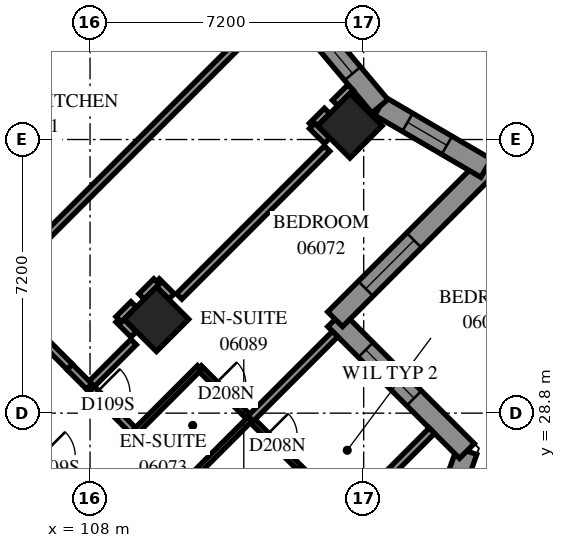
"""IFC4 building model, lengths in metres.
Left out: names, types, materials, properties, quantities, classifications, styles, units other than length and angle.
Written with IfcOpenShell. Run it as: python <this file> out.ifc"""

import sys

from ifc_helpers import new_model, si_unit, direction, frame, frame_2d, origin, origin_2d, place, context, subcontext, project, spatial, polyline, rectangle, outline, extrude, element, fill, save


model = new_model("IFC4")
c1 = context("Model", 3, precision=1e-05, world=origin(), true_north=direction((0.0, 1.0)))
c2 = subcontext(c1, "Body", "Model", "MODEL_VIEW")
j1 = project(units=[si_unit("LENGTHUNIT", "METRE"), si_unit("PLANEANGLEUNIT", "RADIAN")], contexts=[c1])
p1 = place(None, origin())
s1 = spatial("IfcSite", under=j1, at=p1, CompositionType="ELEMENT")
p2 = place(p1, origin())
s2 = spatial("IfcBuilding", under=s1, at=p2, CompositionType="ELEMENT")
p3 = place(p2, frame((0.0, 0.0, 27.0)))
s3 = spatial("IfcBuildingStorey", under=s2, at=p3, CompositionType="ELEMENT", Elevation=27.0)
for number, where, z_axis, x_axis in (
    (1, (114.838, 36.362, 0.0), (0.0, 0.0, 1.0), (0.707, -0.707, 0.0)),
    (2, (109.747, 31.271, 0.0), (0.0, 0.0, 1.0), (0.707, -0.707, 0.0)),
):
    element("IfcColumn", number, at=place(p3, frame(where, z_axis=z_axis, x_axis=x_axis)), inside=s3, PredefinedType="COLUMN", context=c2, shape_type="SweptSolid", body=[
        extrude(rectangle(XDim=1.2, YDim=1.2, at=origin_2d()), origin(), (0.0, 0.0, 1.0), 3.1),
    ])
p4 = place(p3, frame((116.159, 22.837, 0.0), z_axis=(0.0, 0.0, 1.0), x_axis=(0.3333124239, 0.9428164339, 0.0)))
e3 = element("IfcWall", 3, at=p4, inside=s3, PredefinedType="SOLIDWALL", context=c2, shape_type="SweptSolid", body=[
    extrude(outline(polyline([(-0.126, -0.275), (5.443, -0.275), (5.096, 0.275), (0.126, 0.275), (-0.126, -0.275)])), origin(), (0.0, 0.0, 1.0), 3.1),
])
p5 = place(p4, frame((0.816, 0.0, 0.5)))
e4 = element("IfcOpeningElement", 4, at=p5, cuts=e3, PredefinedType="OPENING", context=c2, shape_type="SweptSolid", body=[
    extrude(rectangle(XDim=1.2, YDim=2.45, at=frame_2d((0.6, 1.225))), frame((0.0, 0.285, 0.0), z_axis=(0.0, -1.0, 0.0), x_axis=(1.0, 0.0, 0.0)), (0.0, 0.0, 1.0), 0.57),
])
p6 = place(p4, frame((3.101, 0.0, 0.5)))
e5 = element("IfcOpeningElement", 5, at=p6, cuts=e3, PredefinedType="OPENING", context=c2, shape_type="SweptSolid", body=[
    extrude(rectangle(XDim=1.2, YDim=2.45, at=frame_2d((0.6, 1.225))), frame((0.0, 0.285, 0.0), z_axis=(0.0, -1.0, 0.0), x_axis=(1.0, 0.0, 0.0)), (0.0, 0.0, 1.0), 0.57),
])
p7 = place(p3, frame((117.915, 27.805, 0.0), z_axis=(0.0, 0.0, 1.0), x_axis=(-0.7071067812, 0.7071067812, 0.0)))
e6 = element("IfcWall", 6, at=p7, inside=s3, PredefinedType="SOLIDWALL", context=c2, shape_type="SweptSolid", body=[
    extrude(outline(polyline([(-0.173, -0.275), (4.627, -0.275), (5.177, 0.275), (0.173, 0.275), (-0.173, -0.275)])), origin(), (0.0, 0.0, 1.0), 3.1),
])
p8 = place(p7, frame((1.964, 0.0, 0.6)))
e7 = element("IfcOpeningElement", 7, at=p8, cuts=e6, PredefinedType="OPENING", context=c2, shape_type="SweptSolid", body=[
    extrude(rectangle(XDim=1.8, YDim=1.9, at=frame_2d((0.9, 0.95))), frame((0.0, 0.285, 0.0), z_axis=(0.0, -1.0, 0.0), x_axis=(1.0, 0.0, 0.0)), (0.0, 0.0, 1.0), 0.57),
])
p9 = place(p3, frame((114.449, 31.271, 0.0), z_axis=(0.0, 0.0, 1.0), x_axis=(0.7070978821, 0.7071156801, 0.0)))
e8 = element("IfcWall", 8, at=p9, inside=s3, PredefinedType="SOLIDWALL", context=c2, shape_type="SweptSolid", body=[
    extrude(outline(polyline([(0.275, -0.275), (5.975, -0.275), (5.262, 0.275), (-0.275, 0.275), (0.275, -0.275)])), origin(), (0.0, 0.0, 1.0), 3.1),
])
p10 = place(p9, frame((1.137, 0.0, 0.6)))
e9 = element("IfcOpeningElement", 9, at=p10, cuts=e8, PredefinedType="OPENING", context=c2, shape_type="SweptSolid", body=[
    extrude(rectangle(XDim=1.8, YDim=1.9, at=frame_2d((0.9, 0.95))), frame((0.0, 0.285, 0.0), z_axis=(0.0, -1.0, 0.0), x_axis=(1.0, 0.0, 0.0)), (0.0, 0.0, 1.0), 0.57),
])
p11 = place(p3, frame((118.422, 35.244, 0.0), z_axis=(0.0, 0.0, 1.0), x_axis=(-0.8634425497, 0.5044471859, 0.0)))
e10 = element("IfcWall", 10, at=p11, inside=s3, PredefinedType="SOLIDWALL", context=c2, shape_type="SweptSolid", body=[
    extrude(outline(polyline([(-0.356, -0.275), (3.189, -0.275), (3.284, 0.275), (0.356, 0.275), (-0.356, -0.275)])), origin(), (0.0, 0.0, 1.0), 3.1),
])
p12 = place(p11, frame((1.197, 0.0, 0.5)))
e11 = element("IfcOpeningElement", 11, at=p12, cuts=e10, PredefinedType="OPENING", context=c2, shape_type="SweptSolid", body=[
    extrude(rectangle(XDim=1.2, YDim=2.45, at=frame_2d((0.6, 1.225))), frame((0.0, 0.285, 0.0), z_axis=(0.0, -1.0, 0.0), x_axis=(1.0, 0.0, 0.0)), (0.0, 0.0, 1.0), 0.57),
])
p13 = place(p3, frame((115.627, 36.876, 0.0), z_axis=(0.0, 0.0, 1.0), x_axis=(-0.6427914459, 0.7660412241, 0.0)))
e12 = element("IfcWall", 12, at=p13, inside=s3, PredefinedType="SOLIDWALL", context=c2, shape_type="SweptSolid", body=[
    extrude(outline(polyline([(0.048, -0.275), (3.49, -0.275), (3.442, 0.275), (-0.048, 0.275), (0.048, -0.275)])), origin(), (0.0, 0.0, 1.0), 3.1),
])
p14 = place(p13, frame((1.121, 0.0, 0.5)))
e13 = element("IfcOpeningElement", 13, at=p14, cuts=e12, PredefinedType="OPENING", context=c2, shape_type="SweptSolid", body=[
    extrude(rectangle(XDim=1.2, YDim=2.45, at=frame_2d((0.6, 1.225))), frame((0.0, 0.285, 0.0), z_axis=(0.0, -1.0, 0.0), x_axis=(1.0, 0.0, 0.0)), (0.0, 0.0, 1.0), 0.57),
])
p15 = place(p3, frame((102.609, 31.769, 0.0), z_axis=(0.0, 0.0, 1.0), x_axis=(0.7071067812, -0.7071067812, 0.0)))
e14 = element("IfcWall", 14, at=p15, inside=s3, PredefinedType="PARTITIONING", context=c2, shape_type="SweptSolid", body=[
    extrude(rectangle(XDim=10.723, YDim=0.2, at=frame_2d((5.361, 0.0))), origin(), (0.0, 0.0, 1.0), 3.1),
])
p16 = place(p15, frame((4.15, 0.0, 0.0)))
e15 = element("IfcOpeningElement", 15, at=p16, cuts=e14, PredefinedType="OPENING", context=c2, shape_type="SweptSolid", body=[
    extrude(rectangle(XDim=0.9, YDim=2.1, at=frame_2d((0.45, 1.05))), frame((0.0, 0.11, 0.0), z_axis=(0.0, -1.0, 0.0), x_axis=(1.0, 0.0, 0.0)), (0.0, 0.0, 1.0), 0.22),
])
p17 = place(p15, frame((5.8, 0.0, 0.0)))
e16 = element("IfcOpeningElement", 16, at=p17, cuts=e14, PredefinedType="OPENING", context=c2, shape_type="SweptSolid", body=[
    extrude(rectangle(XDim=0.9, YDim=2.1, at=frame_2d((0.45, 1.05))), frame((0.0, 0.11, 0.0), z_axis=(0.0, -1.0, 0.0), x_axis=(1.0, 0.0, 0.0)), (0.0, 0.0, 1.0), 0.22),
])
p18 = place(p3, frame((105.437, 32.045, 0.0), z_axis=(0.0, 0.0, 1.0), x_axis=(0.7070125995, 0.7072009503, 0.0)))
e17 = element("IfcWall", 17, at=p18, inside=s3, PredefinedType="PARTITIONING", context=c2, shape_type="SweptSolid", body=[
    extrude(rectangle(XDim=10.618, YDim=0.2, at=frame_2d((5.309, 0.0))), origin(), (0.0, 0.0, 1.0), 3.1),
])
p19 = place(p3, frame((107.977, 29.499, 0.0), z_axis=(0.0, 0.0, 1.0), x_axis=(0.7071067812, -0.7071067812, 0.0)))
e18 = element("IfcWall", 18, at=p19, inside=s3, PredefinedType="PARTITIONING", context=c2, shape_type="SweptSolid", body=[
    extrude(rectangle(XDim=7.198, YDim=0.2, at=frame_2d((3.599, 0.0))), origin(), (0.0, 0.0, 1.0), 3.1),
])
p20 = place(p19, frame((0.247, 0.0, 0.0)))
e19 = element("IfcOpeningElement", 19, at=p20, cuts=e18, PredefinedType="OPENING", context=c2, shape_type="SweptSolid", body=[
    extrude(rectangle(XDim=0.9, YDim=2.1, at=frame_2d((0.45, 1.05))), frame((0.0, 0.11, 0.0), z_axis=(0.0, -1.0, 0.0), x_axis=(1.0, 0.0, 0.0)), (0.0, 0.0, 1.0), 0.22),
])
p21 = place(p19, frame((5.899, 0.0, 0.0)))
e20 = element("IfcOpeningElement", 20, at=p21, cuts=e18, PredefinedType="OPENING", context=c2, shape_type="SweptSolid", body=[
    extrude(rectangle(XDim=0.9, YDim=2.1, at=frame_2d((0.45, 1.05))), frame((0.0, 0.11, 0.0), z_axis=(0.0, -1.0, 0.0), x_axis=(1.0, 0.0, 0.0)), (0.0, 0.0, 1.0), 0.22),
])
p22 = place(p3, frame((110.345, 31.871, 0.0), z_axis=(0.0, 0.0, 1.0), x_axis=(0.7071067812, 0.7071067812, 0.0)))
e21 = element("IfcWall", 21, at=p22, inside=s3, PredefinedType="PARTITIONING", context=c2, shape_type="SweptSolid", body=[
    extrude(rectangle(XDim=5.504, YDim=0.2, at=frame_2d((2.752, 0.0))), origin(), (0.0, 0.0, 1.0), 3.1),
])
p23 = place(p3, frame((110.875, 29.995, 0.0), z_axis=(0.0, 0.0, 1.0), x_axis=(0.7071067812, -0.7071067812, 0.0)))
e22 = element("IfcWall", 22, at=p23, inside=s3, PredefinedType="PARTITIONING", context=c2, shape_type="SweptSolid", body=[
    extrude(rectangle(XDim=3.801, YDim=0.15, at=frame_2d((1.901, 0.0))), origin(), (0.0, 0.0, 1.0), 3.1),
])
p24 = place(p23, frame((0.598, 0.0, 0.0)))
e23 = element("IfcOpeningElement", 23, at=p24, cuts=e22, PredefinedType="OPENING", context=c2, shape_type="SweptSolid", body=[
    extrude(rectangle(XDim=0.8, YDim=2.1, at=frame_2d((0.4, 1.05))), frame((0.0, 0.085, 0.0), z_axis=(0.0, -1.0, 0.0), x_axis=(1.0, 0.0, 0.0)), (0.0, 0.0, 1.0), 0.17),
])
p25 = place(p23, frame((2.507, 0.0, 0.0)))
e24 = element("IfcOpeningElement", 24, at=p25, cuts=e22, PredefinedType="OPENING", context=c2, shape_type="SweptSolid", body=[
    extrude(rectangle(XDim=0.8, YDim=2.1, at=frame_2d((0.4, 1.05))), frame((0.0, 0.085, 0.0), z_axis=(0.0, -1.0, 0.0), x_axis=(1.0, 0.0, 0.0)), (0.0, 0.0, 1.0), 0.17),
])
p26 = place(p3, frame((112.221, 28.655, 0.0), z_axis=(0.0, 0.0, 1.0), x_axis=(0.7071067812, 0.7071067812, 0.0)))
e25 = element("IfcWall", 25, at=p26, inside=s3, PredefinedType="PARTITIONING", context=c2, shape_type="SweptSolid", body=[
    extrude(rectangle(XDim=3.15, YDim=0.2, at=frame_2d((1.575, 0.0))), origin(), (0.0, 0.0, 1.0), 3.1),
])
p27 = place(p3, frame((105.435, 32.049, 0.0), z_axis=(0.0, 0.0, 1.0), x_axis=(0.7074545101, -0.7067588812, 0.0)))
e26 = element("IfcWall", 26, at=p27, inside=s3, PredefinedType="PARTITIONING", context=c2, shape_type="SweptSolid", body=[
    extrude(rectangle(XDim=2.875, YDim=0.2, at=frame_2d((1.438, 0.0))), origin(), (0.0, 0.0, 1.0), 3.1),
])
for number, where, z_axis, x_axis in (
    (27, (109.182, 28.3, 0.0), (0.0, 0.0, 1.0), (0.707, 0.708, 0.0)),
    (28, (111.865, 25.616, 0.0), (0.0, 0.0, 1.0), (0.708, 0.707, 0.0)),
    (29, (110.522, 26.96, 0.0), (0.0, 0.0, 1.0), (0.708, 0.707, 0.0)),
):
    element("IfcWall", number, at=place(p3, frame(where, z_axis=z_axis, x_axis=x_axis)), inside=s3, PredefinedType="PARTITIONING", context=c2, shape_type="SweptSolid", body=[
        extrude(rectangle(XDim=2.4, YDim=0.15, at=frame_2d((1.2, 0.0))), origin(), (0.0, 0.0, 1.0), 3.1),
    ])
p28 = place(p3, frame((115.438, 26.78, 0.0), z_axis=(0.0, 0.0, 1.0), x_axis=(0.7071067812, 0.7071067812, 0.0)))
e30 = element("IfcWall", 30, at=p28, inside=s3, PredefinedType="PARTITIONING", context=c2, shape_type="SweptSolid", body=[
    extrude(rectangle(XDim=2.201, YDim=0.2, at=frame_2d((1.101, 0.0))), origin(), (0.0, 0.0, 1.0), 3.1),
])
p29 = place(p3, frame((107.978, 29.504, 0.0), z_axis=(0.0, 0.0, 1.0), x_axis=(0.7071067812, 0.7071067812, 0.0)))
e31 = element("IfcWall", 31, at=p29, inside=s3, PredefinedType="PARTITIONING", context=c2, shape_type="SweptSolid", body=[
    extrude(rectangle(XDim=1.652, YDim=0.2, at=frame_2d((0.826, 0.0))), origin(), (0.0, 0.0, 1.0), 3.1),
])
p30 = place(p3, frame((107.466, 30.014, 0.0), z_axis=(0.0, 0.0, 1.0), x_axis=(0.7057270646, -0.7084838109, 0.0)))
e32 = element("IfcWall", 32, at=p30, inside=s3, PredefinedType="PARTITIONING", context=c2, shape_type="SweptSolid", body=[
    extrude(rectangle(XDim=0.726, YDim=0.2, at=frame_2d((0.363, 0.0))), origin(), (0.0, 0.0, 1.0), 3.1),
])
for number, where, z_axis, x_axis in (
    (33, (113.843, 36.359, 0.0), (0.0, 0.0, 1.0), (0.707, 0.707, 0.0)),
    (34, (108.754, 31.268, 0.0), (0.0, 0.0, 1.0), (0.707, -0.707, 0.0)),
    (35, (109.751, 32.265, 0.0), (0.0, 0.0, 1.0), (0.707, -0.707, 0.0)),
    (36, (109.355, 31.871, 0.0), (0.0, 0.0, 1.0), (0.707, 0.707, 0.0)),
    (37, (108.753, 31.269, 0.0), (0.0, 0.0, 1.0), (0.707, 0.707, 0.0)),
):
    element("IfcWall", number, at=place(p3, frame(where, z_axis=z_axis, x_axis=x_axis)), inside=s3, PredefinedType="PARTITIONING", context=c2, shape_type="SweptSolid", body=[
        extrude(rectangle(XDim=0.557, YDim=0.2, at=frame_2d((0.279, 0.0))), origin(), (0.0, 0.0, 1.0), 3.1),
    ])
p31 = place(p3, frame((113.845, 36.359, 0.0), z_axis=(0.0, 0.0, 1.0), x_axis=(0.7089037401, -0.705305244, 0.0)))
e38 = element("IfcWall", 38, at=p31, inside=s3, PredefinedType="PARTITIONING", context=c2, shape_type="SweptSolid", body=[
    extrude(rectangle(XDim=0.556, YDim=0.2, at=frame_2d((0.278, 0.0))), origin(), (0.0, 0.0, 1.0), 3.1),
])
p32 = place(p3, frame((114.447, 36.963, 0.0), z_axis=(0.0, 0.0, 1.0), x_axis=(0.7071067812, 0.7071067812, 0.0)))
e39 = element("IfcWall", 39, at=p32, inside=s3, PredefinedType="PARTITIONING", context=c2, shape_type="SweptSolid", body=[
    extrude(rectangle(XDim=0.576, YDim=0.2, at=frame_2d((0.288, 0.0))), origin(), (0.0, 0.0, 1.0), 3.1),
])
p33 = place(p8, origin())
e40 = element("IfcWindow", 40, at=p33, inside=s3, PartitioningType="SINGLE_PANEL", PredefinedType="WINDOW", context=c2, shape_type="SweptSolid", body=[
    extrude(rectangle(XDim=1.8, YDim=1.9, at=frame_2d((0.9, 0.95))), frame((0.0, 0.155, 0.0), z_axis=(0.0, -1.0, 0.0), x_axis=(1.0, 0.0, 0.0)), (0.0, 0.0, 1.0), 0.06),
])
fill(e7, e40)
p34 = place(p10, origin())
e41 = element("IfcWindow", 41, at=p34, inside=s3, PartitioningType="SINGLE_PANEL", PredefinedType="WINDOW", context=c2, shape_type="SweptSolid", body=[
    extrude(rectangle(XDim=1.8, YDim=1.9, at=frame_2d((0.9, 0.95))), frame((0.0, 0.155, 0.0), z_axis=(0.0, -1.0, 0.0), x_axis=(1.0, 0.0, 0.0)), (0.0, 0.0, 1.0), 0.06),
])
fill(e9, e41)
p35 = place(p12, origin())
e42 = element("IfcWindow", 42, at=p35, inside=s3, PartitioningType="SINGLE_PANEL", PredefinedType="WINDOW", context=c2, shape_type="SweptSolid", body=[
    extrude(rectangle(XDim=1.2, YDim=2.45, at=frame_2d((0.6, 1.225))), frame((0.0, 0.155, 0.0), z_axis=(0.0, -1.0, 0.0), x_axis=(1.0, 0.0, 0.0)), (0.0, 0.0, 1.0), 0.06),
])
fill(e11, e42)
p36 = place(p14, origin())
e43 = element("IfcWindow", 43, at=p36, inside=s3, PartitioningType="SINGLE_PANEL", PredefinedType="WINDOW", context=c2, shape_type="SweptSolid", body=[
    extrude(rectangle(XDim=1.2, YDim=2.45, at=frame_2d((0.6, 1.225))), frame((0.0, 0.155, 0.0), z_axis=(0.0, -1.0, 0.0), x_axis=(1.0, 0.0, 0.0)), (0.0, 0.0, 1.0), 0.06),
])
fill(e13, e43)
p37 = place(p20, origin())
e44 = element("IfcDoor", 44, at=p37, inside=s3, OperationType="SINGLE_SWING_LEFT", PredefinedType="DOOR", context=c2, shape_type="SweptSolid", body=[
    extrude(rectangle(XDim=0.9, YDim=2.1, at=frame_2d((0.45, 1.05))), frame((0.0, 0.025, 0.0), z_axis=(0.0, -1.0, 0.0), x_axis=(1.0, 0.0, 0.0)), (0.0, 0.0, 1.0), 0.05),
])
fill(e19, e44)
p38 = place(p24, origin())
e45 = element("IfcDoor", 45, at=p38, inside=s3, OperationType="SINGLE_SWING_RIGHT", PredefinedType="DOOR", context=c2, shape_type="SweptSolid", body=[
    extrude(rectangle(XDim=0.8, YDim=2.1, at=frame_2d((0.4, 1.05))), frame((0.0, 0.025, 0.0), z_axis=(0.0, -1.0, 0.0), x_axis=(1.0, 0.0, 0.0)), (0.0, 0.0, 1.0), 0.05),
])
fill(e23, e45)
p39 = place(p17, origin())
e46 = element("IfcDoor", 46, at=p39, inside=s3, OperationType="SINGLE_SWING_RIGHT", PredefinedType="DOOR", context=c2, shape_type="SweptSolid", body=[
    extrude(rectangle(XDim=0.9, YDim=2.1, at=frame_2d((0.45, 1.05))), frame((0.0, 0.025, 0.0), z_axis=(0.0, -1.0, 0.0), x_axis=(1.0, 0.0, 0.0)), (0.0, 0.0, 1.0), 0.05),
])
fill(e16, e46)
p40 = place(p25, origin())
e47 = element("IfcDoor", 47, at=p40, inside=s3, OperationType="SINGLE_SWING_RIGHT", PredefinedType="DOOR", context=c2, shape_type="SweptSolid", body=[
    extrude(rectangle(XDim=0.8, YDim=2.1, at=frame_2d((0.4, 1.05))), frame((0.0, 0.025, 0.0), z_axis=(0.0, -1.0, 0.0), x_axis=(1.0, 0.0, 0.0)), (0.0, 0.0, 1.0), 0.05),
])
fill(e24, e47)
save(model, sys.argv[1])
